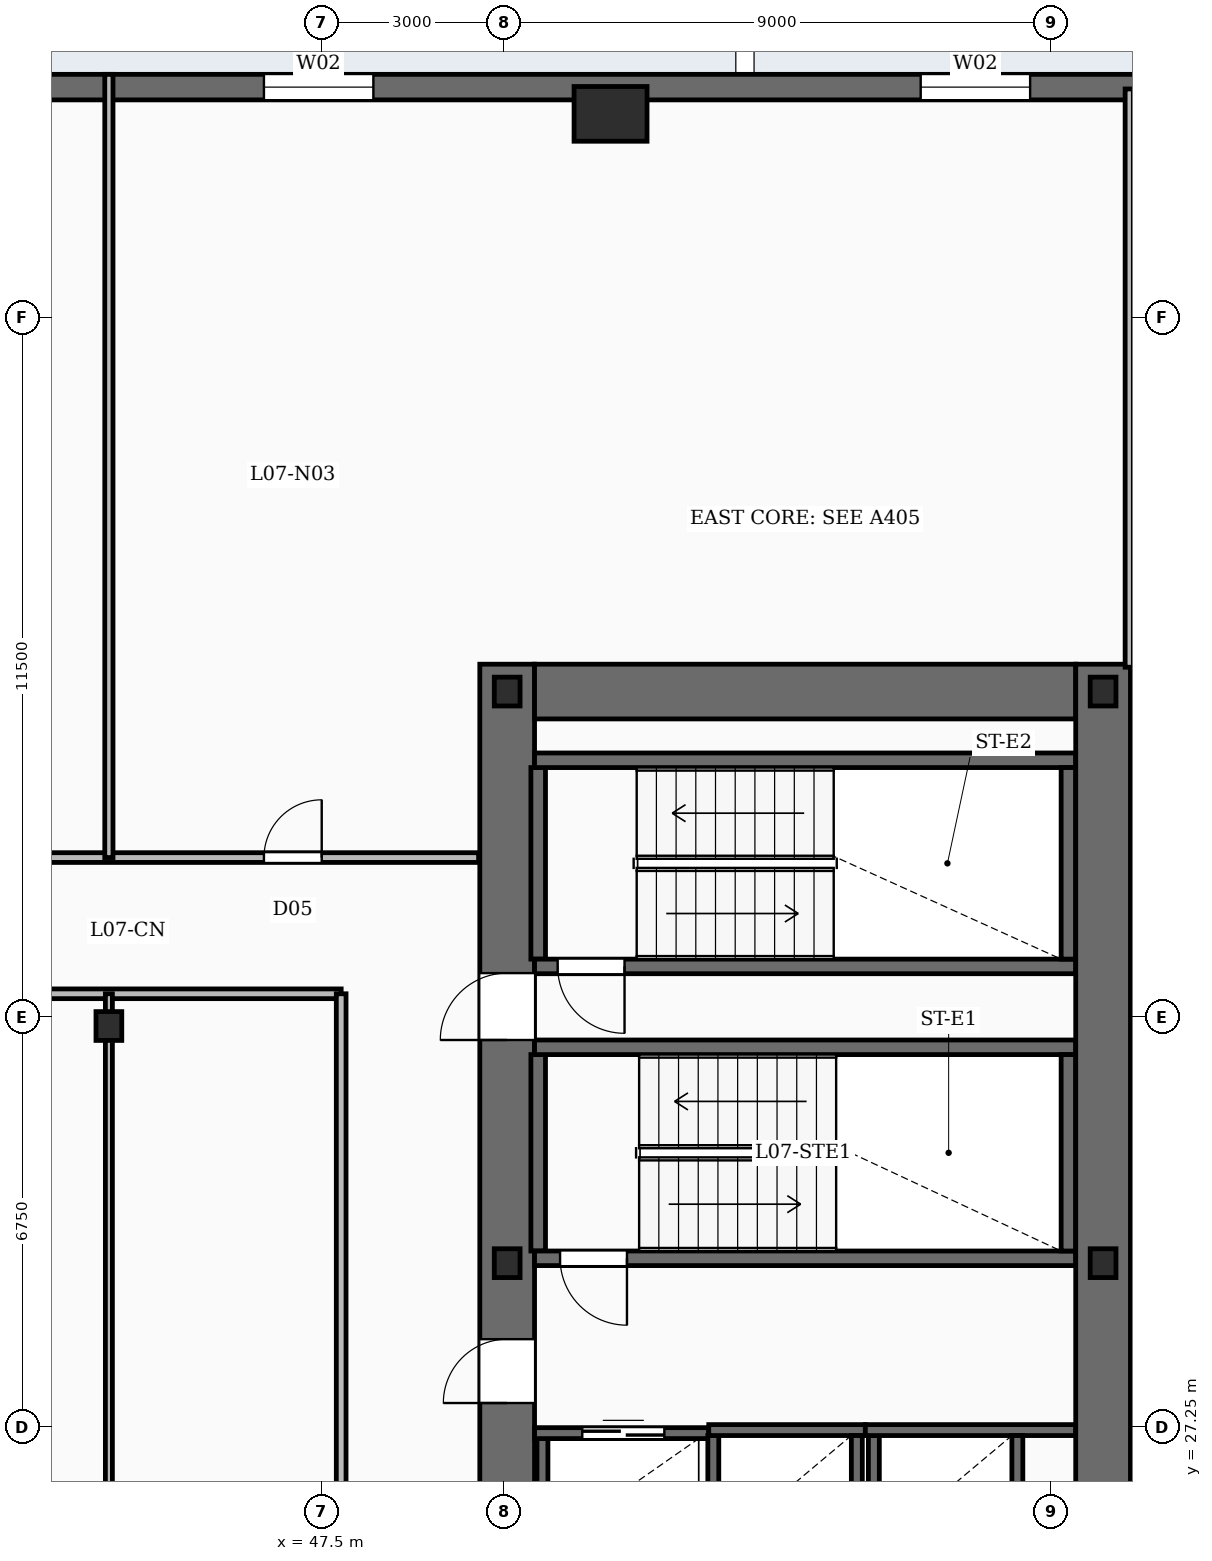
"""IFC4 building model, lengths in metres.
Left out: names, types, materials, properties, quantities, classifications, styles, units other than length and angle.
Written with IfcOpenShell. Run it as: python <this file> out.ifc"""

import sys

from ifc_helpers import new_model, si_unit, direction, frame, frame_2d, origin, origin_2d, place, context, subcontext, project, spatial, rectangle, i_section, extrude, element, fill, save


model = new_model("IFC4")
c1 = context("Model", 3, precision=1e-05, world=origin(), true_north=direction((0.0, 1.0)))
c2 = subcontext(c1, "Body", "Model", "MODEL_VIEW")
j1 = project(units=[si_unit("LENGTHUNIT", "METRE"), si_unit("PLANEANGLEUNIT", "RADIAN")], contexts=[c1])
p1 = place(None, origin())
s1 = spatial("IfcSite", under=j1, at=p1, CompositionType="ELEMENT")
p2 = place(p1, origin())
s2 = spatial("IfcBuilding", under=s1, at=p2, CompositionType="ELEMENT")
p3 = place(p2, frame((0.0, 0.0, 42.0)))
s3 = spatial("IfcBuildingStorey", under=s2, at=p3, CompositionType="ELEMENT", Elevation=42.0)
p4 = place(p3, frame((50.55, 19.0, -0.45), z_axis=(0.0, 0.0, 1.0), x_axis=(0.0, 1.0, 0.0)))
e1 = element("IfcWall", 1, at=p4, inside=s3, PredefinedType="SHEAR", context=c2, shape_type="SweptSolid", body=[
    extrude(rectangle(XDim=20.8, YDim=0.9, at=frame_2d((10.4, 0.0))), origin(), (0.0, 0.0, 1.0), 3.93),
])
p5 = place(p4, frame((2.5, 0.0, 0.45)))
e2 = element("IfcOpeningElement", 2, at=p5, cuts=e1, PredefinedType="OPENING", context=c2, shape_type="SweptSolid", body=[
    extrude(rectangle(XDim=1.05, YDim=2.15, at=frame_2d((0.525, 1.075))), frame((0.0, 0.46, 0.0), z_axis=(0.0, -1.0, 0.0), x_axis=(1.0, 0.0, 0.0)), (0.0, 0.0, 1.0), 0.92),
])
p6 = place(p4, frame((8.65, 0.0, 0.45)))
e3 = element("IfcOpeningElement", 3, at=p6, cuts=e1, PredefinedType="OPENING", context=c2, shape_type="SweptSolid", body=[
    extrude(rectangle(XDim=1.05, YDim=2.15, at=frame_2d((0.525, 1.075))), frame((0.0, 0.46, 0.0), z_axis=(0.0, -1.0, 0.0), x_axis=(1.0, 0.0, 0.0)), (0.0, 0.0, 1.0), 0.92),
])
p7 = place(p4, frame((14.62, 0.0, 0.45)))
e4 = element("IfcOpeningElement", 4, at=p7, cuts=e1, PredefinedType="OPENING", context=c2, shape_type="SweptSolid", body=[
    extrude(rectangle(XDim=1.1, YDim=2.15, at=frame_2d((0.55, 1.075))), frame((0.0, 0.46, 0.0), z_axis=(0.0, -1.0, 0.0), x_axis=(1.0, 0.0, 0.0)), (0.0, 0.0, 1.0), 0.92),
])
p8 = place(p3, frame((60.35, 19.0, -0.45), z_axis=(0.0, 0.0, 1.0), x_axis=(0.0, 1.0, 0.0)))
e5 = element("IfcWall", 5, at=p8, inside=s3, PredefinedType="SHEAR", context=c2, shape_type="SweptSolid", body=[
    extrude(rectangle(XDim=20.8, YDim=0.9, at=frame_2d((10.4, 0.0))), origin(), (0.0, 0.0, 1.0), 3.93),
])
p9 = place(p3, frame((51.0, 39.35, -0.45), z_axis=(0.0, 0.0, 1.0), x_axis=(1.0, 0.0, 0.0)))
e6 = element("IfcWall", 6, at=p9, inside=s3, PredefinedType="SHEAR", context=c2, shape_type="SweptSolid", body=[
    extrude(rectangle(XDim=8.9, YDim=0.9, at=frame_2d((4.45, 0.0))), origin(), (0.0, 0.0, 1.0), 3.93),
])
for number, where, z_axis, x_axis in (
    (7, (50.55, 29.95, -0.45), (0.0, 0.0, 1.0), (1.0, 0.0, 0.0)),
    (8, (60.35, 29.95, -0.45), (0.0, 0.0, 1.0), (1.0, 0.0, 0.0)),
    (9, (50.55, 39.35, -0.45), (0.0, 0.0, 1.0), (1.0, 0.0, 0.0)),
    (10, (60.35, 39.35, -0.45), (0.0, 0.0, 1.0), (1.0, 0.0, 0.0)),
    (11, (44.0, 33.85, -0.45), (0.0, 0.0, 1.0), (1.0, 0.0, 0.0)),
):
    element("IfcColumn", number, at=place(p3, frame(where, z_axis=z_axis, x_axis=x_axis)), inside=s3, PredefinedType="COLUMN", context=c2, shape_type="SweptSolid", body=[
        extrude(i_section(OverallWidth=0.424, OverallDepth=0.474, WebThickness=0.048, FlangeThickness=0.077, FilletRadius=0.02, at=origin_2d()), origin(), (0.0, 0.0, 1.0), 3.93),
    ])
p10 = place(p3, frame((52.25, 48.85, -0.45), z_axis=(0.0, 0.0, 1.0), x_axis=(1.0, 0.0, 0.0)))
e12 = element("IfcColumn", 12, at=p10, inside=s3, PredefinedType="COLUMN", context=c2, shape_type="SweptSolid", body=[
    extrude(rectangle(XDim=1.2, YDim=0.9, at=origin_2d()), origin(), (0.0, 0.0, 1.0), 3.93),
])
p11 = place(p3, frame((6.15, 49.29, 0.0), z_axis=(0.0, 0.0, 1.0), x_axis=(1.0, 0.0, 0.0)))
e13 = element("IfcWall", 13, at=p11, inside=s3, PredefinedType="SOLIDWALL", context=c2, shape_type="SweptSolid", body=[
    extrude(rectangle(XDim=61.7, YDim=0.42, at=frame_2d((30.85, 0.0))), origin(), (0.0, 0.0, 1.0), 3.48),
])
p12 = place(p11, frame((2.6, 0.0, 0.88)))
e14 = element("IfcOpeningElement", 14, at=p12, cuts=e13, PredefinedType="OPENING", context=c2, shape_type="SweptSolid", body=[
    extrude(rectangle(XDim=1.8, YDim=2.15, at=frame_2d((0.9, 1.075))), frame((0.0, 0.22, 0.0), z_axis=(0.0, -1.0, 0.0), x_axis=(1.0, 0.0, 0.0)), (0.0, 0.0, 1.0), 0.44),
])
p13 = place(p11, frame((18.8, 0.0, 0.88)))
e15 = element("IfcOpeningElement", 15, at=p13, cuts=e13, PredefinedType="OPENING", context=c2, shape_type="SweptSolid", body=[
    extrude(rectangle(XDim=1.8, YDim=2.15, at=frame_2d((0.9, 1.075))), frame((0.0, 0.22, 0.0), z_axis=(0.0, -1.0, 0.0), x_axis=(1.0, 0.0, 0.0)), (0.0, 0.0, 1.0), 0.44),
])
p14 = place(p11, frame((35.0, 0.0, 0.88)))
e16 = element("IfcOpeningElement", 16, at=p14, cuts=e13, PredefinedType="OPENING", context=c2, shape_type="SweptSolid", body=[
    extrude(rectangle(XDim=1.8, YDim=2.15, at=frame_2d((0.9, 1.075))), frame((0.0, 0.22, 0.0), z_axis=(0.0, -1.0, 0.0), x_axis=(1.0, 0.0, 0.0)), (0.0, 0.0, 1.0), 0.44),
])
p15 = place(p11, frame((40.4, 0.0, 0.88)))
e17 = element("IfcOpeningElement", 17, at=p15, cuts=e13, PredefinedType="OPENING", context=c2, shape_type="SweptSolid", body=[
    extrude(rectangle(XDim=1.8, YDim=2.15, at=frame_2d((0.9, 1.075))), frame((0.0, 0.22, 0.0), z_axis=(0.0, -1.0, 0.0), x_axis=(1.0, 0.0, 0.0)), (0.0, 0.0, 1.0), 0.44),
])
p16 = place(p11, frame((51.2, 0.0, 0.88)))
e18 = element("IfcOpeningElement", 18, at=p16, cuts=e13, PredefinedType="OPENING", context=c2, shape_type="SweptSolid", body=[
    extrude(rectangle(XDim=1.8, YDim=2.15, at=frame_2d((0.9, 1.075))), frame((0.0, 0.22, 0.0), z_axis=(0.0, -1.0, 0.0), x_axis=(1.0, 0.0, 0.0)), (0.0, 0.0, 1.0), 0.44),
])
p17 = place(p11, frame((56.6, 0.0, 0.88)))
e19 = element("IfcOpeningElement", 19, at=p17, cuts=e13, PredefinedType="OPENING", context=c2, shape_type="SweptSolid", body=[
    extrude(rectangle(XDim=1.8, YDim=2.15, at=frame_2d((0.9, 1.075))), frame((0.0, 0.22, 0.0), z_axis=(0.0, -1.0, 0.0), x_axis=(1.0, 0.0, 0.0)), (0.0, 0.0, 1.0), 0.44),
])
p18 = place(p3, frame((59.9, 30.03, 0.0), z_axis=(0.0, 0.0, 1.0), x_axis=(-1.0, 0.0, 0.0)))
e20 = element("IfcWall", 20, at=p18, inside=s3, PredefinedType="SOLIDWALL", context=c2, shape_type="SweptSolid", body=[
    extrude(rectangle(XDim=8.9, YDim=0.24, at=frame_2d((4.45, 0.0))), origin(), (0.0, 0.0, 1.0), 3.48),
])
p19 = place(p18, frame((7.38, 0.0, 0.0)))
e21 = element("IfcOpeningElement", 21, at=p19, cuts=e20, PredefinedType="OPENING", context=c2, shape_type="SweptSolid", body=[
    extrude(rectangle(XDim=1.1, YDim=2.15, at=frame_2d((0.55, 1.075))), frame((0.0, 0.13, 0.0), z_axis=(0.0, -1.0, 0.0), x_axis=(1.0, 0.0, 0.0)), (0.0, 0.0, 1.0), 0.26),
])
p20 = place(p3, frame((51.0, 33.5, 0.0), z_axis=(0.0, 0.0, 1.0), x_axis=(1.0, 0.0, 0.0)))
e22 = element("IfcWall", 22, at=p20, inside=s3, PredefinedType="SOLIDWALL", context=c2, shape_type="SweptSolid", body=[
    extrude(rectangle(XDim=8.9, YDim=0.24, at=frame_2d((4.45, 0.0))), origin(), (0.0, 0.0, 1.0), 3.48),
])
for number, where, z_axis, x_axis in (
    (23, (51.06, 30.15, 0.0), (0.0, 0.0, 1.0), (0.0, 1.0, 0.0)),
    (24, (59.78, 30.15, 0.0), (0.0, 0.0, 1.0), (0.0, 1.0, 0.0)),
):
    element("IfcWall", number, at=place(p3, frame(where, z_axis=z_axis, x_axis=x_axis)), inside=s3, PredefinedType="SOLIDWALL", context=c2, shape_type="SweptSolid", body=[
        extrude(rectangle(XDim=3.23, YDim=0.24, at=frame_2d((1.615, 0.0))), origin(), (0.0, 0.0, 1.0), 3.48),
    ])
p21 = place(p3, frame((59.9, 34.83, 0.0), z_axis=(0.0, 0.0, 1.0), x_axis=(-1.0, 0.0, 0.0)))
e25 = element("IfcWall", 25, at=p21, inside=s3, PredefinedType="SOLIDWALL", context=c2, shape_type="SweptSolid", body=[
    extrude(rectangle(XDim=8.9, YDim=0.24, at=frame_2d((4.45, 0.0))), origin(), (0.0, 0.0, 1.0), 3.48),
])
p22 = place(p21, frame((7.42, 0.0, 0.0)))
e26 = element("IfcOpeningElement", 26, at=p22, cuts=e25, PredefinedType="OPENING", context=c2, shape_type="SweptSolid", body=[
    extrude(rectangle(XDim=1.1, YDim=2.15, at=frame_2d((0.55, 1.075))), frame((0.0, 0.13, 0.0), z_axis=(0.0, -1.0, 0.0), x_axis=(1.0, 0.0, 0.0)), (0.0, 0.0, 1.0), 0.26),
])
p23 = place(p3, frame((51.0, 38.22, 0.0), z_axis=(0.0, 0.0, 1.0), x_axis=(1.0, 0.0, 0.0)))
e27 = element("IfcWall", 27, at=p23, inside=s3, PredefinedType="SOLIDWALL", context=c2, shape_type="SweptSolid", body=[
    extrude(rectangle(XDim=8.9, YDim=0.24, at=frame_2d((4.45, 0.0))), origin(), (0.0, 0.0, 1.0), 3.48),
])
for number, where, z_axis, x_axis in (
    (28, (51.06, 34.95, 0.0), (0.0, 0.0, 1.0), (0.0, 1.0, 0.0)),
    (29, (59.78, 34.95, 0.0), (0.0, 0.0, 1.0), (0.0, 1.0, 0.0)),
):
    element("IfcWall", number, at=place(p3, frame(where, z_axis=z_axis, x_axis=x_axis)), inside=s3, PredefinedType="SOLIDWALL", context=c2, shape_type="SweptSolid", body=[
        extrude(rectangle(XDim=3.15, YDim=0.24, at=frame_2d((1.575, 0.0))), origin(), (0.0, 0.0, 1.0), 3.48),
    ])
p24 = place(p3, frame((53.865, 27.205, 0.0), z_axis=(0.0, 0.0, 1.0), x_axis=(1.0, 0.0, 0.0)))
e30 = element("IfcWall", 30, at=p24, inside=s3, PredefinedType="SOLIDWALL", context=c2, shape_type="SweptSolid", body=[
    extrude(rectangle(XDim=2.575, YDim=0.18, at=frame_2d((1.288, 0.0))), origin(), (0.0, 0.0, 1.0), 3.48),
])
for number, where, z_axis, x_axis in (
    (31, (53.94, 25.285, 0.0), (0.0, 0.0, 1.0), (0.0, 1.0, 0.0)),
    (32, (56.3, 25.285, 0.0), (0.0, 0.0, 1.0), (0.0, 1.0, 0.0)),
):
    element("IfcWall", number, at=place(p3, frame(where, z_axis=z_axis, x_axis=x_axis)), inside=s3, PredefinedType="SOLIDWALL", context=c2, shape_type="SweptSolid", body=[
        extrude(rectangle(XDim=1.83, YDim=0.18, at=frame_2d((0.915, 0.0))), origin(), (0.0, 0.0, 1.0), 3.48),
    ])
p25 = place(p3, frame((56.44, 27.205, 0.0), z_axis=(0.0, 0.0, 1.0), x_axis=(1.0, 0.0, 0.0)))
e33 = element("IfcWall", 33, at=p25, inside=s3, PredefinedType="SOLIDWALL", context=c2, shape_type="SweptSolid", body=[
    extrude(rectangle(XDim=3.46, YDim=0.18, at=frame_2d((1.73, 0.0))), origin(), (0.0, 0.0, 1.0), 3.48),
])
for number, where, z_axis, x_axis in (
    (34, (56.58, 25.285, 0.0), (0.0, 0.0, 1.0), (0.0, 1.0, 0.0)),
    (35, (58.94, 25.285, 0.0), (0.0, 0.0, 1.0), (0.0, 1.0, 0.0)),
):
    element("IfcWall", number, at=place(p3, frame(where, z_axis=z_axis, x_axis=x_axis)), inside=s3, PredefinedType="SOLIDWALL", context=c2, shape_type="SweptSolid", body=[
        extrude(rectangle(XDim=1.83, YDim=0.18, at=frame_2d((0.915, 0.0))), origin(), (0.0, 0.0, 1.0), 3.48),
    ])
p26 = place(p3, frame((51.0, 27.155, 0.0), z_axis=(0.0, 0.0, 1.0), x_axis=(1.0, 0.0, 0.0)))
e36 = element("IfcWall", 36, at=p26, inside=s3, PredefinedType="SOLIDWALL", context=c2, shape_type="SweptSolid", body=[
    extrude(rectangle(XDim=2.865, YDim=0.18, at=frame_2d((1.433, 0.0))), origin(), (0.0, 0.0, 1.0), 3.48),
])
p27 = place(p26, frame((0.785, 0.0, 0.0)))
e37 = element("IfcOpeningElement", 37, at=p27, cuts=e36, PredefinedType="OPENING", context=c2, shape_type="SweptSolid", body=[
    extrude(rectangle(XDim=1.35, YDim=2.3, at=frame_2d((0.675, 1.15))), frame((0.0, 0.1, 0.0), z_axis=(0.0, -1.0, 0.0), x_axis=(1.0, 0.0, 0.0)), (0.0, 0.0, 1.0), 0.2),
])
p28 = place(p3, frame((51.13, 25.335, 0.0), z_axis=(0.0, 0.0, 1.0), x_axis=(0.0, 1.0, 0.0)))
e38 = element("IfcWall", 38, at=p28, inside=s3, PredefinedType="SOLIDWALL", context=c2, shape_type="SweptSolid", body=[
    extrude(rectangle(XDim=1.73, YDim=0.18, at=frame_2d((0.865, 0.0))), origin(), (0.0, 0.0, 1.0), 3.48),
])
p29 = place(p3, frame((44.0, 36.62, 0.0), z_axis=(0.0, 0.0, 1.0), x_axis=(0.0, 1.0, 0.0)))
e39 = element("IfcWall", 39, at=p29, inside=s3, PredefinedType="PARTITIONING", context=c2, shape_type="SweptSolid", body=[
    extrude(rectangle(XDim=12.88, YDim=0.135, at=frame_2d((6.44, 0.0))), origin(), (0.0, 0.0, 1.0), 2.54),
])
p30 = place(p3, frame((60.78, 39.75, 0.0), z_axis=(0.0, 0.0, 1.0), x_axis=(0.0, 1.0, 0.0)))
e40 = element("IfcWall", 40, at=p30, inside=s3, PredefinedType="PARTITIONING", context=c2, shape_type="SweptSolid", body=[
    extrude(rectangle(XDim=9.51, YDim=0.135, at=frame_2d((4.755, 0.0))), origin(), (0.0, 0.0, 1.0), 2.54),
])
p31 = place(p3, frame((24.82, 36.62, 0.0), z_axis=(0.0, 0.0, 1.0), x_axis=(1.0, 0.0, 0.0)))
e41 = element("IfcWall", 41, at=p31, inside=s3, PredefinedType="PARTITIONING", context=c2, shape_type="SweptSolid", body=[
    extrude(rectangle(XDim=25.26, YDim=0.16, at=frame_2d((12.63, 0.0))), origin(), (0.0, 0.0, 1.0), 2.54),
])
p32 = place(p31, frame((2.63, 0.0, 0.0)))
e42 = element("IfcOpeningElement", 42, at=p32, cuts=e41, PredefinedType="OPENING", context=c2, shape_type="SweptSolid", body=[
    extrude(rectangle(XDim=0.95, YDim=2.15, at=frame_2d((0.475, 1.075))), frame((0.0, 0.09, 0.0), z_axis=(0.0, -1.0, 0.0), x_axis=(1.0, 0.0, 0.0)), (0.0, 0.0, 1.0), 0.18),
])
p33 = place(p31, frame((12.205, 0.0, 0.0)))
e43 = element("IfcOpeningElement", 43, at=p33, cuts=e41, PredefinedType="OPENING", context=c2, shape_type="SweptSolid", body=[
    extrude(rectangle(XDim=0.95, YDim=2.15, at=frame_2d((0.475, 1.075))), frame((0.0, 0.09, 0.0), z_axis=(0.0, -1.0, 0.0), x_axis=(1.0, 0.0, 0.0)), (0.0, 0.0, 1.0), 0.18),
])
p34 = place(p31, frame((21.73, 0.0, 0.0)))
e44 = element("IfcOpeningElement", 44, at=p34, cuts=e41, PredefinedType="OPENING", context=c2, shape_type="SweptSolid", body=[
    extrude(rectangle(XDim=0.95, YDim=2.15, at=frame_2d((0.475, 1.075))), frame((0.0, 0.09, 0.0), z_axis=(0.0, -1.0, 0.0), x_axis=(1.0, 0.0, 0.0)), (0.0, 0.0, 1.0), 0.18),
])
p35 = place(p3, frame((44.0, 15.38, 0.0), z_axis=(0.0, 0.0, 1.0), x_axis=(0.0, 1.0, 0.0)))
e45 = element("IfcWall", 45, at=p35, inside=s3, PredefinedType="PARTITIONING", context=c2, shape_type="SweptSolid", body=[
    extrude(rectangle(XDim=19.0, YDim=0.115, at=frame_2d((9.5, 0.0))), origin(), (0.0, 0.0, 1.0), 2.54),
])
p36 = place(p3, frame((27.08, 34.38, 0.0), z_axis=(0.0, 0.0, 1.0), x_axis=(1.0, 0.0, 0.0)))
e46 = element("IfcWall", 46, at=p36, inside=s3, PredefinedType="PARTITIONING", context=c2, shape_type="SweptSolid", body=[
    extrude(rectangle(XDim=20.74, YDim=0.16, at=frame_2d((10.37, 0.0))), origin(), (0.0, 0.0, 1.0), 2.54),
])
p37 = place(p3, frame((47.82, 15.38, 0.0), z_axis=(0.0, 0.0, 1.0), x_axis=(0.0, 1.0, 0.0)))
e47 = element("IfcWall", 47, at=p37, inside=s3, PredefinedType="PARTITIONING", context=c2, shape_type="SweptSolid", body=[
    extrude(rectangle(XDim=19.0, YDim=0.16, at=frame_2d((9.5, 0.0))), origin(), (0.0, 0.0, 1.0), 2.54),
])
p38 = place(p15, origin())
e48 = element("IfcWindow", 48, at=p38, inside=s3, PartitioningType="DOUBLE_PANEL_VERTICAL", PredefinedType="WINDOW", context=c2, shape_type="SweptSolid", body=[
    extrude(rectangle(XDim=1.8, YDim=2.15, at=frame_2d((0.9, 1.075))), frame((0.0, 0.03, 0.0), z_axis=(0.0, -1.0, 0.0), x_axis=(1.0, 0.0, 0.0)), (0.0, 0.0, 1.0), 0.06),
])
fill(e17, e48)
p39 = place(p16, origin())
e49 = element("IfcWindow", 49, at=p39, inside=s3, PartitioningType="DOUBLE_PANEL_VERTICAL", PredefinedType="WINDOW", context=c2, shape_type="SweptSolid", body=[
    extrude(rectangle(XDim=1.8, YDim=2.15, at=frame_2d((0.9, 1.075))), frame((0.0, 0.03, 0.0), z_axis=(0.0, -1.0, 0.0), x_axis=(1.0, 0.0, 0.0)), (0.0, 0.0, 1.0), 0.06),
])
fill(e18, e49)
p40 = place(p6, origin())
e50 = element("IfcDoor", 50, at=p40, inside=s3, OperationType="SINGLE_SWING_LEFT", PredefinedType="DOOR", context=c2, shape_type="SweptSolid", body=[
    extrude(rectangle(XDim=1.05, YDim=2.15, at=frame_2d((0.525, 1.075))), frame((0.0, 0.025, 0.0), z_axis=(0.0, -1.0, 0.0), x_axis=(1.0, 0.0, 0.0)), (0.0, 0.0, 1.0), 0.05),
])
fill(e3, e50)
p41 = place(p7, origin())
e51 = element("IfcDoor", 51, at=p41, inside=s3, OperationType="SINGLE_SWING_LEFT", PredefinedType="DOOR", context=c2, shape_type="SweptSolid", body=[
    extrude(rectangle(XDim=1.1, YDim=2.15, at=frame_2d((0.55, 1.075))), frame((0.0, 0.025, 0.0), z_axis=(0.0, -1.0, 0.0), x_axis=(1.0, 0.0, 0.0)), (0.0, 0.0, 1.0), 0.05),
])
fill(e4, e51)
p42 = place(p19, origin())
e52 = element("IfcDoor", 52, at=p42, inside=s3, OperationType="SINGLE_SWING_LEFT", PredefinedType="DOOR", context=c2, shape_type="SweptSolid", body=[
    extrude(rectangle(XDim=1.1, YDim=2.15, at=frame_2d((0.55, 1.075))), frame((0.0, 0.025, 0.0), z_axis=(0.0, -1.0, 0.0), x_axis=(1.0, 0.0, 0.0)), (0.0, 0.0, 1.0), 0.05),
])
fill(e21, e52)
p43 = place(p22, origin())
e53 = element("IfcDoor", 53, at=p43, inside=s3, OperationType="SINGLE_SWING_LEFT", PredefinedType="DOOR", context=c2, shape_type="SweptSolid", body=[
    extrude(rectangle(XDim=1.1, YDim=2.15, at=frame_2d((0.55, 1.075))), frame((0.0, 0.025, 0.0), z_axis=(0.0, -1.0, 0.0), x_axis=(1.0, 0.0, 0.0)), (0.0, 0.0, 1.0), 0.05),
])
fill(e26, e53)
p44 = place(p27, origin())
e54 = element("IfcDoor", 54, at=p44, inside=s3, OperationType="DOUBLE_DOOR_SLIDING", PredefinedType="DOOR", context=c2, shape_type="SweptSolid", body=[
    extrude(rectangle(XDim=1.35, YDim=2.3, at=frame_2d((0.675, 1.15))), frame((0.0, 0.025, 0.0), z_axis=(0.0, -1.0, 0.0), x_axis=(1.0, 0.0, 0.0)), (0.0, 0.0, 1.0), 0.05),
])
fill(e37, e54)
p45 = place(p34, origin())
e55 = element("IfcDoor", 55, at=p45, inside=s3, OperationType="SINGLE_SWING_RIGHT", PredefinedType="DOOR", context=c2, shape_type="SweptSolid", body=[
    extrude(rectangle(XDim=0.95, YDim=2.15, at=frame_2d((0.475, 1.075))), frame((0.0, 0.025, 0.0), z_axis=(0.0, -1.0, 0.0), x_axis=(1.0, 0.0, 0.0)), (0.0, 0.0, 1.0), 0.05),
])
fill(e44, e55)
save(model, sys.argv[1])
